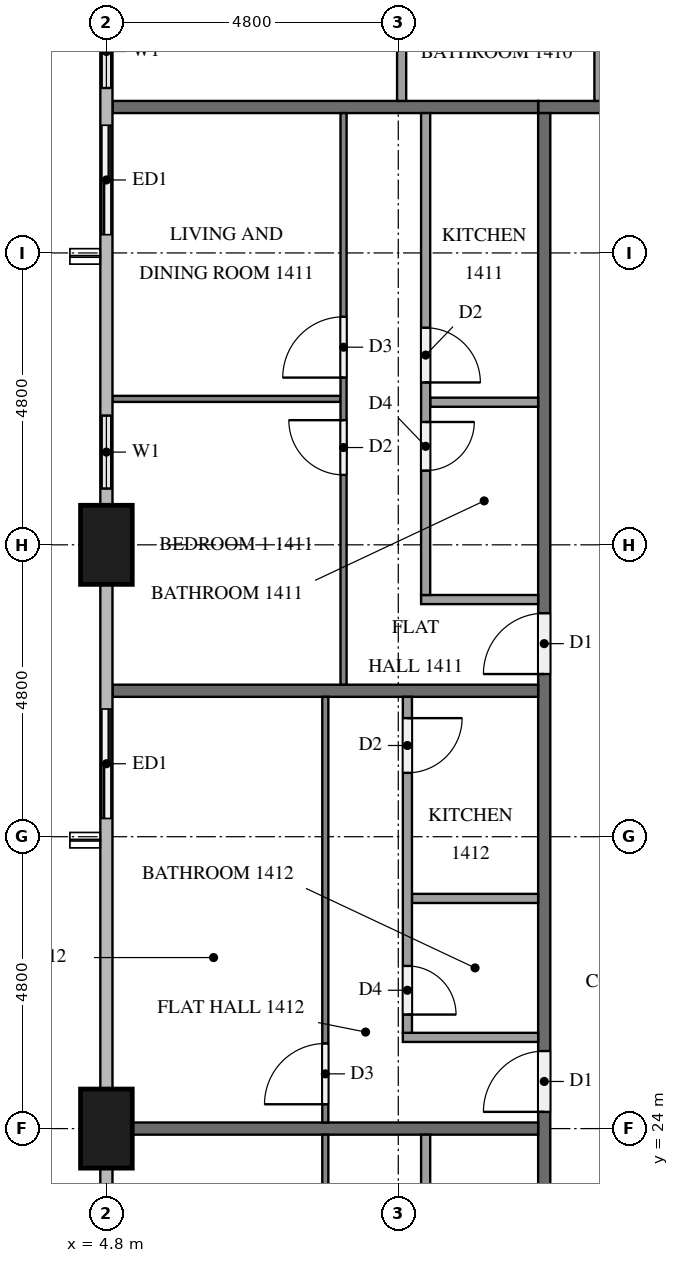
"""IFC4 building model, lengths in metres.
Left out: names, types, materials, properties, quantities, classifications, styles, units other than length and angle.
Written with IfcOpenShell. Run it as: python <this file> out.ifc"""

import sys

from ifc_helpers import new_model, si_unit, direction, frame, frame_2d, origin, origin_2d, place, context, subcontext, project, spatial, rectangle, extrude, element, fill, save


model = new_model("IFC4")
c1 = context("Model", 3, precision=1e-05, world=origin(), true_north=direction((0.0, 1.0)))
c2 = subcontext(c1, "Body", "Model", "MODEL_VIEW")
j1 = project(units=[si_unit("LENGTHUNIT", "METRE"), si_unit("PLANEANGLEUNIT", "RADIAN")], contexts=[c1])
p1 = place(None, origin())
s1 = spatial("IfcSite", under=j1, at=p1, CompositionType="ELEMENT")
p2 = place(p1, origin())
s2 = spatial("IfcBuilding", under=s1, at=p2, CompositionType="ELEMENT")
p3 = place(p2, frame((0.0, 0.0, 59.3)))
s3 = spatial("IfcBuildingStorey", under=s2, at=p3, CompositionType="ELEMENT", Elevation=59.3)
for number, where, z_axis, x_axis in (
    (1, (4.8, 33.6, 0.0), (0.0, 0.0, 1.0), (0.0, 1.0, 0.0)),
    (2, (4.8, 24.0, 0.0), (0.0, 0.0, 1.0), (0.0, 1.0, 0.0)),
):
    element("IfcColumn", number, at=place(p3, frame(where, z_axis=z_axis, x_axis=x_axis)), inside=s3, PredefinedType="COLUMN", context=c2, shape_type="SweptSolid", body=[
        extrude(rectangle(XDim=1.3, YDim=0.85, at=origin_2d()), origin(), (0.0, 0.0, 1.0), 3.2),
    ])
p4 = place(p3, frame((4.8, 42.625, 0.0), z_axis=(0.0, 0.0, 1.0), x_axis=(0.0, -1.0, 0.0)))
e3 = element("IfcWall", 3, at=p4, inside=s3, PredefinedType="SOLIDWALL", context=c2, shape_type="SweptSolid", body=[
    extrude(rectangle(XDim=4.225, YDim=0.15, at=frame_2d((2.113, 0.0))), origin(), (0.0, 0.0, 1.0), 3.2),
])
p5 = place(p4, frame((0.312, 0.0, 0.9)))
e4 = element("IfcOpeningElement", 4, at=p5, cuts=e3, PredefinedType="OPENING", context=c2, shape_type="SweptSolid", body=[
    extrude(rectangle(XDim=1.2, YDim=1.4, at=frame_2d((0.6, 0.7))), frame((0.0, 0.085, 0.0), z_axis=(0.0, -1.0, 0.0), x_axis=(1.0, 0.0, 0.0)), (0.0, 0.0, 1.0), 0.17),
])
p6 = place(p4, frame((2.125, 0.0, 0.0)))
e5 = element("IfcOpeningElement", 5, at=p6, cuts=e3, PredefinedType="OPENING", context=c2, shape_type="SweptSolid", body=[
    extrude(rectangle(XDim=1.8, YDim=2.4, at=frame_2d((0.9, 1.2))), frame((0.0, 0.085, 0.0), z_axis=(0.0, -1.0, 0.0), x_axis=(1.0, 0.0, 0.0)), (0.0, 0.0, 1.0), 0.17),
])
p7 = place(p3, frame((4.8, 36.0, 0.0), z_axis=(0.0, 0.0, 1.0), x_axis=(0.0, -1.0, 0.0)))
e6 = element("IfcWall", 6, at=p7, inside=s3, PredefinedType="SOLIDWALL", context=c2, shape_type="SweptSolid", body=[
    extrude(rectangle(XDim=1.75, YDim=0.15, at=frame_2d((0.875, 0.0))), origin(), (0.0, 0.0, 1.0), 3.2),
])
p8 = place(p7, frame((0.275, 0.0, 0.9)))
e7 = element("IfcOpeningElement", 7, at=p8, cuts=e6, PredefinedType="OPENING", context=c2, shape_type="SweptSolid", body=[
    extrude(rectangle(XDim=1.2, YDim=1.4, at=frame_2d((0.6, 0.7))), frame((0.0, 0.085, 0.0), z_axis=(0.0, -1.0, 0.0), x_axis=(1.0, 0.0, 0.0)), (0.0, 0.0, 1.0), 0.17),
])
p9 = place(p3, frame((4.8, 31.2, 0.0), z_axis=(0.0, 0.0, 1.0), x_axis=(0.0, -1.0, 0.0)))
e8 = element("IfcWall", 8, at=p9, inside=s3, PredefinedType="SOLIDWALL", context=c2, shape_type="SweptSolid", body=[
    extrude(rectangle(XDim=2.4, YDim=0.15, at=frame_2d((1.2, 0.0))), origin(), (0.0, 0.0, 1.0), 3.2),
])
p10 = place(p9, frame((0.3, 0.0, 0.0)))
e9 = element("IfcOpeningElement", 9, at=p10, cuts=e8, PredefinedType="OPENING", context=c2, shape_type="SweptSolid", body=[
    extrude(rectangle(XDim=1.8, YDim=2.4, at=frame_2d((0.9, 1.2))), frame((0.0, 0.085, 0.0), z_axis=(0.0, -1.0, 0.0), x_axis=(1.0, 0.0, 0.0)), (0.0, 0.0, 1.0), 0.17),
])
p11 = place(p3, frame((4.8, 23.35, 0.0), z_axis=(0.0, 0.0, 1.0), x_axis=(0.0, -1.0, 0.0)))
e10 = element("IfcWall", 10, at=p11, inside=s3, PredefinedType="SOLIDWALL", context=c2, shape_type="SweptSolid", body=[
    extrude(rectangle(XDim=1.75, YDim=0.15, at=frame_2d((0.875, 0.0))), origin(), (0.0, 0.0, 1.0), 3.2),
])
p12 = place(p11, frame((0.275, 0.0, 0.9)))
e11 = element("IfcOpeningElement", 11, at=p12, cuts=e10, PredefinedType="OPENING", context=c2, shape_type="SweptSolid", body=[
    extrude(rectangle(XDim=1.2, YDim=1.4, at=frame_2d((0.6, 0.7))), frame((0.0, 0.085, 0.0), z_axis=(0.0, -1.0, 0.0), x_axis=(1.0, 0.0, 0.0)), (0.0, 0.0, 1.0), 0.17),
])
p13 = place(p3, frame((11.9, 40.8, 0.0), z_axis=(0.0, 0.0, 1.0), x_axis=(1.0, 0.0, 0.0)))
e12 = element("IfcWall", 12, at=p13, inside=s3, PredefinedType="PARTITIONING", context=c2, shape_type="SweptSolid", body=[
    extrude(rectangle(XDim=38.6, YDim=0.2, at=frame_2d((19.3, 0.0))), origin(), (0.0, 0.0, 1.0), 3.2),
])
p14 = place(p13, frame((36.375, 0.0, 0.0)))
e13 = element("IfcOpeningElement", 13, at=p14, cuts=e12, PredefinedType="OPENING", context=c2, shape_type="SweptSolid", body=[
    extrude(rectangle(XDim=1.0, YDim=2.1, at=frame_2d((0.5, 1.05))), frame((0.0, 0.11, 0.0), z_axis=(0.0, -1.0, 0.0), x_axis=(1.0, 0.0, 0.0)), (0.0, 0.0, 1.0), 0.22),
])
p15 = place(p13, frame((17.125, 0.0, 0.0)))
e14 = element("IfcOpeningElement", 14, at=p15, cuts=e12, PredefinedType="OPENING", context=c2, shape_type="SweptSolid", body=[
    extrude(rectangle(XDim=1.1, YDim=2.1, at=frame_2d((0.55, 1.05))), frame((0.0, 0.11, 0.0), z_axis=(0.0, -1.0, 0.0), x_axis=(1.0, 0.0, 0.0)), (0.0, 0.0, 1.0), 0.22),
])
p16 = place(p13, frame((15.625, 0.0, 0.0)))
e15 = element("IfcOpeningElement", 15, at=p16, cuts=e12, PredefinedType="OPENING", context=c2, shape_type="SweptSolid", body=[
    extrude(rectangle(XDim=1.0, YDim=2.1, at=frame_2d((0.5, 1.05))), frame((0.0, 0.11, 0.0), z_axis=(0.0, -1.0, 0.0), x_axis=(1.0, 0.0, 0.0)), (0.0, 0.0, 1.0), 0.22),
])
p17 = place(p13, frame((1.225, 0.0, 0.0)))
e16 = element("IfcOpeningElement", 16, at=p17, cuts=e12, PredefinedType="OPENING", context=c2, shape_type="SweptSolid", body=[
    extrude(rectangle(XDim=1.0, YDim=2.1, at=frame_2d((0.5, 1.05))), frame((0.0, 0.11, 0.0), z_axis=(0.0, -1.0, 0.0), x_axis=(1.0, 0.0, 0.0)), (0.0, 0.0, 1.0), 0.22),
])
p18 = place(p3, frame((12.0, 12.1, 0.0), z_axis=(0.0, 0.0, 1.0), x_axis=(0.0, 1.0, 0.0)))
e17 = element("IfcWall", 17, at=p18, inside=s3, PredefinedType="PARTITIONING", context=c2, shape_type="SweptSolid", body=[
    extrude(rectangle(XDim=28.6, YDim=0.2, at=frame_2d((14.3, 0.0))), origin(), (0.0, 0.0, 1.0), 3.2),
])
p19 = place(p18, frame((19.375, 0.0, 0.0)))
e18 = element("IfcOpeningElement", 18, at=p19, cuts=e17, PredefinedType="OPENING", context=c2, shape_type="SweptSolid", body=[
    extrude(rectangle(XDim=1.0, YDim=2.1, at=frame_2d((0.5, 1.05))), frame((0.0, 0.11, 0.0), z_axis=(0.0, -1.0, 0.0), x_axis=(1.0, 0.0, 0.0)), (0.0, 0.0, 1.0), 0.22),
])
p20 = place(p18, frame((12.175, 0.0, 0.0)))
e19 = element("IfcOpeningElement", 19, at=p20, cuts=e17, PredefinedType="OPENING", context=c2, shape_type="SweptSolid", body=[
    extrude(rectangle(XDim=1.0, YDim=2.1, at=frame_2d((0.5, 1.05))), frame((0.0, 0.11, 0.0), z_axis=(0.0, -1.0, 0.0), x_axis=(1.0, 0.0, 0.0)), (0.0, 0.0, 1.0), 0.22),
])
p21 = place(p18, frame((2.575, 0.0, 0.0)))
e20 = element("IfcOpeningElement", 20, at=p21, cuts=e17, PredefinedType="OPENING", context=c2, shape_type="SweptSolid", body=[
    extrude(rectangle(XDim=1.0, YDim=2.1, at=frame_2d((0.5, 1.05))), frame((0.0, 0.11, 0.0), z_axis=(0.0, -1.0, 0.0), x_axis=(1.0, 0.0, 0.0)), (0.0, 0.0, 1.0), 0.22),
])
p22 = place(p18, frame((1.025, 0.0, 0.0)))
e21 = element("IfcOpeningElement", 21, at=p22, cuts=e17, PredefinedType="OPENING", context=c2, shape_type="SweptSolid", body=[
    extrude(rectangle(XDim=1.0, YDim=2.1, at=frame_2d((0.5, 1.05))), frame((0.0, 0.11, 0.0), z_axis=(0.0, -1.0, 0.0), x_axis=(1.0, 0.0, 0.0)), (0.0, 0.0, 1.0), 0.22),
])
for number, where, z_axis, x_axis in (
    (22, (4.9, 40.8, 0.0), (0.0, 0.0, 1.0), (1.0, 0.0, 0.0)),
    (23, (4.9, 31.2, 0.0), (0.0, 0.0, 1.0), (1.0, 0.0, 0.0)),
):
    element("IfcWall", number, at=place(p3, frame(where, z_axis=z_axis, x_axis=x_axis)), inside=s3, PredefinedType="PARTITIONING", context=c2, shape_type="SweptSolid", body=[
        extrude(rectangle(XDim=7.0, YDim=0.2, at=frame_2d((3.5, 0.0))), origin(), (0.0, 0.0, 1.0), 3.2),
    ])
p23 = place(p3, frame((5.225, 24.0, 0.0), z_axis=(0.0, 0.0, 1.0), x_axis=(1.0, 0.0, 0.0)))
e24 = element("IfcWall", 24, at=p23, inside=s3, PredefinedType="PARTITIONING", context=c2, shape_type="SweptSolid", body=[
    extrude(rectangle(XDim=6.675, YDim=0.2, at=frame_2d((3.337, 0.0))), origin(), (0.0, 0.0, 1.0), 3.2),
])
p24 = place(p3, frame((9.655, 40.9, 0.0), z_axis=(0.0, 0.0, 1.0), x_axis=(0.0, 1.0, 0.0)))
e25 = element("IfcWall", 25, at=p24, inside=s3, PredefinedType="PARTITIONING", context=c2, shape_type="SweptSolid", body=[
    extrude(rectangle(XDim=1.775, YDim=0.15, at=frame_2d((0.888, 0.0))), origin(), (0.0, 0.0, 1.0), 3.2),
])
p25 = place(p3, frame((12.9, 40.9, 0.0), z_axis=(0.0, 0.0, 1.0), x_axis=(0.0, 1.0, 0.0)))
e26 = element("IfcWall", 26, at=p25, inside=s3, PredefinedType="PARTITIONING", context=c2, shape_type="SweptSolid", body=[
    extrude(rectangle(XDim=1.925, YDim=0.15, at=frame_2d((0.962, 0.0))), origin(), (0.0, 0.0, 1.0), 3.2),
])
p26 = place(p3, frame((8.65, 36.0, 0.0), z_axis=(0.0, 0.0, 1.0), x_axis=(-1.0, 0.0, 0.0)))
e27 = element("IfcWall", 27, at=p26, inside=s3, PredefinedType="PARTITIONING", context=c2, shape_type="SweptSolid", body=[
    extrude(rectangle(XDim=3.75, YDim=0.1, at=frame_2d((1.875, 0.0))), origin(), (0.0, 0.0, 1.0), 3.2),
])
p27 = place(p3, frame((8.7, 31.3, 0.0), z_axis=(0.0, 0.0, 1.0), x_axis=(0.0, 1.0, 0.0)))
e28 = element("IfcWall", 28, at=p27, inside=s3, PredefinedType="PARTITIONING", context=c2, shape_type="SweptSolid", body=[
    extrude(rectangle(XDim=9.4, YDim=0.1, at=frame_2d((4.7, 0.0))), origin(), (0.0, 0.0, 1.0), 3.2),
])
p28 = place(p27, frame((3.45, 0.0, 0.0)))
e29 = element("IfcOpeningElement", 29, at=p28, cuts=e28, PredefinedType="OPENING", context=c2, shape_type="SweptSolid", body=[
    extrude(rectangle(XDim=0.9, YDim=2.1, at=frame_2d((0.45, 1.05))), frame((0.0, 0.06, 0.0), z_axis=(0.0, -1.0, 0.0), x_axis=(1.0, 0.0, 0.0)), (0.0, 0.0, 1.0), 0.12),
])
p29 = place(p27, frame((5.05, 0.0, 0.0)))
e30 = element("IfcOpeningElement", 30, at=p29, cuts=e28, PredefinedType="OPENING", context=c2, shape_type="SweptSolid", body=[
    extrude(rectangle(XDim=1.0, YDim=2.1, at=frame_2d((0.5, 1.05))), frame((0.0, 0.06, 0.0), z_axis=(0.0, -1.0, 0.0), x_axis=(1.0, 0.0, 0.0)), (0.0, 0.0, 1.0), 0.12),
])
p30 = place(p3, frame((11.9, 35.945, 0.0), z_axis=(0.0, 0.0, 1.0), x_axis=(-1.0, 0.0, 0.0)))
e31 = element("IfcWall", 31, at=p30, inside=s3, PredefinedType="PARTITIONING", context=c2, shape_type="SweptSolid", body=[
    extrude(rectangle(XDim=1.775, YDim=0.15, at=frame_2d((0.887, 0.0))), origin(), (0.0, 0.0, 1.0), 3.2),
])
p31 = place(p3, frame((11.9, 32.7, 0.0), z_axis=(0.0, 0.0, 1.0), x_axis=(-1.0, 0.0, 0.0)))
e32 = element("IfcWall", 32, at=p31, inside=s3, PredefinedType="PARTITIONING", context=c2, shape_type="SweptSolid", body=[
    extrude(rectangle(XDim=1.925, YDim=0.15, at=frame_2d((0.962, 0.0))), origin(), (0.0, 0.0, 1.0), 3.2),
])
p32 = place(p3, frame((10.05, 40.7, 0.0), z_axis=(0.0, 0.0, 1.0), x_axis=(0.0, -1.0, 0.0)))
e33 = element("IfcWall", 33, at=p32, inside=s3, PredefinedType="PARTITIONING", context=c2, shape_type="SweptSolid", body=[
    extrude(rectangle(XDim=7.925, YDim=0.15, at=frame_2d((3.962, 0.0))), origin(), (0.0, 0.0, 1.0), 3.2),
])
p33 = place(p32, frame((5.08, 0.0, 0.0)))
e34 = element("IfcOpeningElement", 34, at=p33, cuts=e33, PredefinedType="OPENING", context=c2, shape_type="SweptSolid", body=[
    extrude(rectangle(XDim=0.8, YDim=2.1, at=frame_2d((0.4, 1.05))), frame((0.0, 0.085, 0.0), z_axis=(0.0, -1.0, 0.0), x_axis=(1.0, 0.0, 0.0)), (0.0, 0.0, 1.0), 0.17),
])
p34 = place(p32, frame((3.53, 0.0, 0.0)))
e35 = element("IfcOpeningElement", 35, at=p34, cuts=e33, PredefinedType="OPENING", context=c2, shape_type="SweptSolid", body=[
    extrude(rectangle(XDim=0.9, YDim=2.1, at=frame_2d((0.45, 1.05))), frame((0.0, 0.085, 0.0), z_axis=(0.0, -1.0, 0.0), x_axis=(1.0, 0.0, 0.0)), (0.0, 0.0, 1.0), 0.17),
])
p35 = place(p3, frame((8.4, 24.1, 0.0), z_axis=(0.0, 0.0, 1.0), x_axis=(0.0, 1.0, 0.0)))
e36 = element("IfcWall", 36, at=p35, inside=s3, PredefinedType="PARTITIONING", context=c2, shape_type="SweptSolid", body=[
    extrude(rectangle(XDim=7.0, YDim=0.1, at=frame_2d((3.5, 0.0))), origin(), (0.0, 0.0, 1.0), 3.2),
])
p36 = place(p35, frame((0.3, 0.0, 0.0)))
e37 = element("IfcOpeningElement", 37, at=p36, cuts=e36, PredefinedType="OPENING", context=c2, shape_type="SweptSolid", body=[
    extrude(rectangle(XDim=1.0, YDim=2.1, at=frame_2d((0.5, 1.05))), frame((0.0, 0.06, 0.0), z_axis=(0.0, -1.0, 0.0), x_axis=(1.0, 0.0, 0.0)), (0.0, 0.0, 1.0), 0.12),
])
p37 = place(p3, frame((11.9, 27.785, 0.0), z_axis=(0.0, 0.0, 1.0), x_axis=(-1.0, 0.0, 0.0)))
e38 = element("IfcWall", 38, at=p37, inside=s3, PredefinedType="PARTITIONING", context=c2, shape_type="SweptSolid", body=[
    extrude(rectangle(XDim=2.075, YDim=0.15, at=frame_2d((1.038, 0.0))), origin(), (0.0, 0.0, 1.0), 3.2),
])
p38 = place(p3, frame((11.9, 25.5, 0.0), z_axis=(0.0, 0.0, 1.0), x_axis=(-1.0, 0.0, 0.0)))
e39 = element("IfcWall", 39, at=p38, inside=s3, PredefinedType="PARTITIONING", context=c2, shape_type="SweptSolid", body=[
    extrude(rectangle(XDim=2.225, YDim=0.15, at=frame_2d((1.112, 0.0))), origin(), (0.0, 0.0, 1.0), 3.2),
])
p39 = place(p3, frame((9.75, 31.1, 0.0), z_axis=(0.0, 0.0, 1.0), x_axis=(0.0, -1.0, 0.0)))
e40 = element("IfcWall", 40, at=p39, inside=s3, PredefinedType="PARTITIONING", context=c2, shape_type="SweptSolid", body=[
    extrude(rectangle(XDim=5.525, YDim=0.15, at=frame_2d((2.763, 0.0))), origin(), (0.0, 0.0, 1.0), 3.2),
])
p40 = place(p39, frame((4.425, 0.0, 0.0)))
e41 = element("IfcOpeningElement", 41, at=p40, cuts=e40, PredefinedType="OPENING", context=c2, shape_type="SweptSolid", body=[
    extrude(rectangle(XDim=0.8, YDim=2.1, at=frame_2d((0.4, 1.05))), frame((0.0, 0.085, 0.0), z_axis=(0.0, -1.0, 0.0), x_axis=(1.0, 0.0, 0.0)), (0.0, 0.0, 1.0), 0.17),
])
p41 = place(p39, frame((0.35, 0.0, 0.0)))
e42 = element("IfcOpeningElement", 42, at=p41, cuts=e40, PredefinedType="OPENING", context=c2, shape_type="SweptSolid", body=[
    extrude(rectangle(XDim=0.9, YDim=2.1, at=frame_2d((0.45, 1.05))), frame((0.0, 0.085, 0.0), z_axis=(0.0, -1.0, 0.0), x_axis=(1.0, 0.0, 0.0)), (0.0, 0.0, 1.0), 0.17),
])
p42 = place(p3, frame((8.4, 14.5, 0.0), z_axis=(0.0, 0.0, 1.0), x_axis=(0.0, 1.0, 0.0)))
e43 = element("IfcWall", 43, at=p42, inside=s3, PredefinedType="PARTITIONING", context=c2, shape_type="SweptSolid", body=[
    extrude(rectangle(XDim=9.4, YDim=0.1, at=frame_2d((4.7, 0.0))), origin(), (0.0, 0.0, 1.0), 3.2),
])
p43 = place(p42, frame((3.35, 0.0, 0.0)))
e44 = element("IfcOpeningElement", 44, at=p43, cuts=e43, PredefinedType="OPENING", context=c2, shape_type="SweptSolid", body=[
    extrude(rectangle(XDim=1.0, YDim=2.1, at=frame_2d((0.5, 1.05))), frame((0.0, 0.06, 0.0), z_axis=(0.0, -1.0, 0.0), x_axis=(1.0, 0.0, 0.0)), (0.0, 0.0, 1.0), 0.12),
])
p44 = place(p42, frame((5.05, 0.0, 0.0)))
e45 = element("IfcOpeningElement", 45, at=p44, cuts=e43, PredefinedType="OPENING", context=c2, shape_type="SweptSolid", body=[
    extrude(rectangle(XDim=0.9, YDim=2.1, at=frame_2d((0.45, 1.05))), frame((0.0, 0.06, 0.0), z_axis=(0.0, -1.0, 0.0), x_axis=(1.0, 0.0, 0.0)), (0.0, 0.0, 1.0), 0.12),
])
p45 = place(p3, frame((10.05, 23.9, 0.0), z_axis=(0.0, 0.0, 1.0), x_axis=(0.0, -1.0, 0.0)))
e46 = element("IfcWall", 46, at=p45, inside=s3, PredefinedType="PARTITIONING", context=c2, shape_type="SweptSolid", body=[
    extrude(rectangle(XDim=7.925, YDim=0.15, at=frame_2d((3.962, 0.0))), origin(), (0.0, 0.0, 1.0), 3.2),
])
p46 = place(p45, frame((5.08, 0.0, 0.0)))
e47 = element("IfcOpeningElement", 47, at=p46, cuts=e46, PredefinedType="OPENING", context=c2, shape_type="SweptSolid", body=[
    extrude(rectangle(XDim=0.8, YDim=2.1, at=frame_2d((0.4, 1.05))), frame((0.0, 0.085, 0.0), z_axis=(0.0, -1.0, 0.0), x_axis=(1.0, 0.0, 0.0)), (0.0, 0.0, 1.0), 0.17),
])
p47 = place(p45, frame((3.53, 0.0, 0.0)))
e48 = element("IfcOpeningElement", 48, at=p47, cuts=e46, PredefinedType="OPENING", context=c2, shape_type="SweptSolid", body=[
    extrude(rectangle(XDim=0.9, YDim=2.1, at=frame_2d((0.45, 1.05))), frame((0.0, 0.085, 0.0), z_axis=(0.0, -1.0, 0.0), x_axis=(1.0, 0.0, 0.0)), (0.0, 0.0, 1.0), 0.17),
])
p48 = place(p5, origin())
e49 = element("IfcWindow", 49, at=p48, inside=s3, PartitioningType="SINGLE_PANEL", PredefinedType="WINDOW", context=c2, shape_type="SweptSolid", body=[
    extrude(rectangle(XDim=1.2, YDim=1.4, at=frame_2d((0.6, 0.7))), frame((0.0, 0.03, 0.0), z_axis=(0.0, -1.0, 0.0), x_axis=(1.0, 0.0, 0.0)), (0.0, 0.0, 1.0), 0.06),
])
fill(e4, e49)
p49 = place(p6, origin())
e50 = element("IfcDoor", 50, at=p49, inside=s3, OperationType="SLIDING_TO_RIGHT", PredefinedType="DOOR", context=c2, shape_type="SweptSolid", body=[
    extrude(rectangle(XDim=1.8, YDim=2.4, at=frame_2d((0.9, 1.2))), frame((0.0, 0.025, 0.0), z_axis=(0.0, -1.0, 0.0), x_axis=(1.0, 0.0, 0.0)), (0.0, 0.0, 1.0), 0.05),
])
fill(e5, e50)
p50 = place(p8, origin())
e51 = element("IfcWindow", 51, at=p50, inside=s3, PartitioningType="SINGLE_PANEL", PredefinedType="WINDOW", context=c2, shape_type="SweptSolid", body=[
    extrude(rectangle(XDim=1.2, YDim=1.4, at=frame_2d((0.6, 0.7))), frame((0.0, 0.03, 0.0), z_axis=(0.0, -1.0, 0.0), x_axis=(1.0, 0.0, 0.0)), (0.0, 0.0, 1.0), 0.06),
])
fill(e7, e51)
p51 = place(p10, origin())
e52 = element("IfcDoor", 52, at=p51, inside=s3, OperationType="SLIDING_TO_LEFT", PredefinedType="DOOR", context=c2, shape_type="SweptSolid", body=[
    extrude(rectangle(XDim=1.8, YDim=2.4, at=frame_2d((0.9, 1.2))), frame((0.0, 0.025, 0.0), z_axis=(0.0, -1.0, 0.0), x_axis=(1.0, 0.0, 0.0)), (0.0, 0.0, 1.0), 0.05),
])
fill(e9, e52)
p52 = place(p19, origin())
e53 = element("IfcDoor", 53, at=p52, inside=s3, OperationType="SINGLE_SWING_LEFT", PredefinedType="DOOR", context=c2, shape_type="SweptSolid", body=[
    extrude(rectangle(XDim=1.0, YDim=2.1, at=frame_2d((0.5, 1.05))), frame((0.0, 0.025, 0.0), z_axis=(0.0, -1.0, 0.0), x_axis=(1.0, 0.0, 0.0)), (0.0, 0.0, 1.0), 0.05),
])
fill(e18, e53)
p53 = place(p20, origin())
e54 = element("IfcDoor", 54, at=p53, inside=s3, OperationType="SINGLE_SWING_LEFT", PredefinedType="DOOR", context=c2, shape_type="SweptSolid", body=[
    extrude(rectangle(XDim=1.0, YDim=2.1, at=frame_2d((0.5, 1.05))), frame((0.0, 0.025, 0.0), z_axis=(0.0, -1.0, 0.0), x_axis=(1.0, 0.0, 0.0)), (0.0, 0.0, 1.0), 0.05),
])
fill(e19, e54)
p54 = place(p28, origin())
e55 = element("IfcDoor", 55, at=p54, inside=s3, OperationType="SINGLE_SWING_RIGHT", PredefinedType="DOOR", context=c2, shape_type="SweptSolid", body=[
    extrude(rectangle(XDim=0.9, YDim=2.1, at=frame_2d((0.45, 1.05))), frame((0.0, 0.025, 0.0), z_axis=(0.0, -1.0, 0.0), x_axis=(1.0, 0.0, 0.0)), (0.0, 0.0, 1.0), 0.05),
])
fill(e29, e55)
p55 = place(p29, origin())
e56 = element("IfcDoor", 56, at=p55, inside=s3, OperationType="SINGLE_SWING_LEFT", PredefinedType="DOOR", context=c2, shape_type="SweptSolid", body=[
    extrude(rectangle(XDim=1.0, YDim=2.1, at=frame_2d((0.5, 1.05))), frame((0.0, 0.025, 0.0), z_axis=(0.0, -1.0, 0.0), x_axis=(1.0, 0.0, 0.0)), (0.0, 0.0, 1.0), 0.05),
])
fill(e30, e56)
p56 = place(p33, origin())
e57 = element("IfcDoor", 57, at=p56, inside=s3, OperationType="SINGLE_SWING_LEFT", PredefinedType="DOOR", context=c2, shape_type="SweptSolid", body=[
    extrude(rectangle(XDim=0.8, YDim=2.1, at=frame_2d((0.4, 1.05))), frame((0.0, 0.025, 0.0), z_axis=(0.0, -1.0, 0.0), x_axis=(1.0, 0.0, 0.0)), (0.0, 0.0, 1.0), 0.05),
])
fill(e34, e57)
p57 = place(p34, origin())
e58 = element("IfcDoor", 58, at=p57, inside=s3, OperationType="SINGLE_SWING_RIGHT", PredefinedType="DOOR", context=c2, shape_type="SweptSolid", body=[
    extrude(rectangle(XDim=0.9, YDim=2.1, at=frame_2d((0.45, 1.05))), frame((0.0, 0.025, 0.0), z_axis=(0.0, -1.0, 0.0), x_axis=(1.0, 0.0, 0.0)), (0.0, 0.0, 1.0), 0.05),
])
fill(e35, e58)
p58 = place(p36, origin())
e59 = element("IfcDoor", 59, at=p58, inside=s3, OperationType="SINGLE_SWING_LEFT", PredefinedType="DOOR", context=c2, shape_type="SweptSolid", body=[
    extrude(rectangle(XDim=1.0, YDim=2.1, at=frame_2d((0.5, 1.05))), frame((0.0, 0.025, 0.0), z_axis=(0.0, -1.0, 0.0), x_axis=(1.0, 0.0, 0.0)), (0.0, 0.0, 1.0), 0.05),
])
fill(e37, e59)
p59 = place(p40, origin())
e60 = element("IfcDoor", 60, at=p59, inside=s3, OperationType="SINGLE_SWING_RIGHT", PredefinedType="DOOR", context=c2, shape_type="SweptSolid", body=[
    extrude(rectangle(XDim=0.8, YDim=2.1, at=frame_2d((0.4, 1.05))), frame((0.0, 0.025, 0.0), z_axis=(0.0, -1.0, 0.0), x_axis=(1.0, 0.0, 0.0)), (0.0, 0.0, 1.0), 0.05),
])
fill(e41, e60)
p60 = place(p41, origin())
e61 = element("IfcDoor", 61, at=p60, inside=s3, OperationType="SINGLE_SWING_LEFT", PredefinedType="DOOR", context=c2, shape_type="SweptSolid", body=[
    extrude(rectangle(XDim=0.9, YDim=2.1, at=frame_2d((0.45, 1.05))), frame((0.0, 0.025, 0.0), z_axis=(0.0, -1.0, 0.0), x_axis=(1.0, 0.0, 0.0)), (0.0, 0.0, 1.0), 0.05),
])
fill(e42, e61)
save(model, sys.argv[1])
